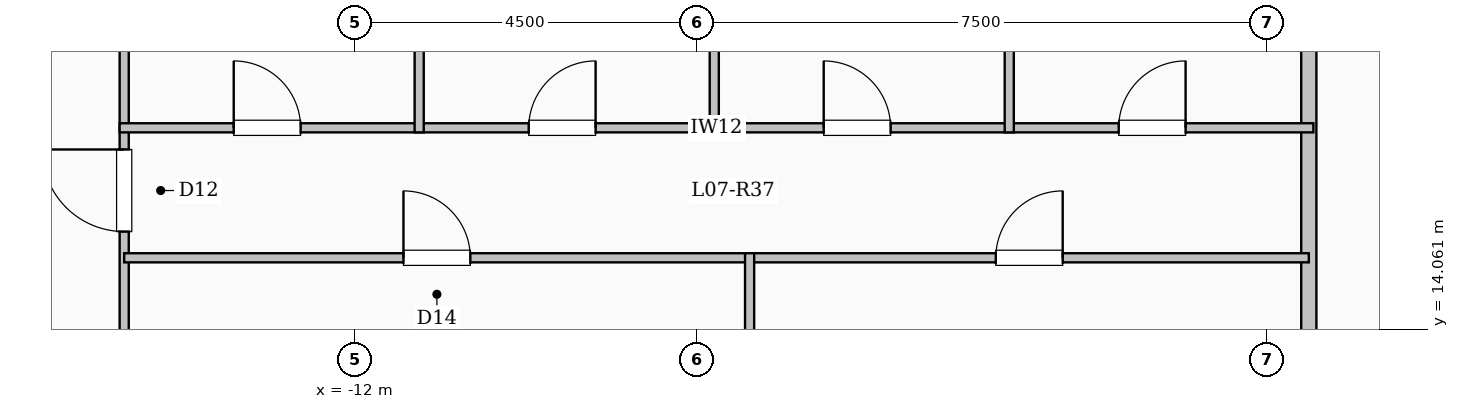
"""IFC4 building model, lengths in metres.
Left out: names, types, materials, properties, quantities, classifications, styles, units other than length and angle.
Written with IfcOpenShell. Run it as: python <this file> out.ifc"""

import sys

from ifc_helpers import new_model, si_unit, direction, frame, frame_2d, origin, place, context, subcontext, project, spatial, rectangle, extrude, element, fill, save


model = new_model("IFC4")
c1 = context("Model", 3, precision=1e-05, world=origin(), true_north=direction((0.0, 1.0)))
c2 = subcontext(c1, "Body", "Model", "MODEL_VIEW")
j1 = project(units=[si_unit("LENGTHUNIT", "METRE"), si_unit("PLANEANGLEUNIT", "RADIAN")], contexts=[c1])
p1 = place(None, origin())
s1 = spatial("IfcSite", under=j1, at=p1, CompositionType="ELEMENT")
p2 = place(p1, origin())
s2 = spatial("IfcBuilding", under=s1, at=p2, CompositionType="ELEMENT")
p3 = place(p2, frame((0.0, 0.0, 30.7)))
s3 = spatial("IfcBuildingStorey", under=s2, at=p3, CompositionType="ELEMENT", Elevation=30.7)
p4 = place(p3, frame((0.55, 12.5, 0.0), z_axis=(0.0, 0.0, 1.0), x_axis=(0.0, 1.0, 0.0)))
e1 = element("IfcWall", 1, at=p4, inside=s3, PredefinedType="SOLIDWALL", context=c2, shape_type="SweptSolid", body=[
    extrude(rectangle(XDim=12.58, YDim=0.2, at=frame_2d((6.29, 0.0))), origin(), (0.0, 0.0, 1.0), 3.1),
])
p5 = place(p3, frame((-15.035, 12.44, 0.0), z_axis=(0.0, 0.0, 1.0), x_axis=(0.0, 1.0, 0.0)))
e2 = element("IfcWall", 2, at=p5, inside=s3, PredefinedType="PARTITIONING", context=c2, shape_type="SweptSolid", body=[
    extrude(rectangle(XDim=11.16, YDim=0.12, at=frame_2d((5.58, 0.0))), origin(), (0.0, 0.0, 1.0), 2.435),
])
p6 = place(p5, frame((2.905, 0.0, 0.0)))
e3 = element("IfcOpeningElement", 3, at=p6, cuts=e2, PredefinedType="OPENING", context=c2, shape_type="SweptSolid", body=[
    extrude(rectangle(XDim=1.08, YDim=2.15, at=frame_2d((0.54, 1.075))), frame((0.0, 0.07, 0.0), z_axis=(0.0, -1.0, 0.0), x_axis=(1.0, 0.0, 0.0)), (0.0, 0.0, 1.0), 0.14),
])
p7 = place(p3, frame((-15.035, 15.0, 0.0), z_axis=(0.0, 0.0, 1.0), x_axis=(1.0, 0.0, 0.0)))
e4 = element("IfcWall", 4, at=p7, inside=s3, PredefinedType="PARTITIONING", context=c2, shape_type="SweptSolid", body=[
    extrude(rectangle(XDim=8.228, YDim=0.12, at=frame_2d((4.114, 0.0))), origin(), (0.0, 0.0, 1.0), 2.585),
])
p8 = place(p7, frame((3.674, 0.0, 0.0)))
e5 = element("IfcOpeningElement", 5, at=p8, cuts=e4, PredefinedType="OPENING", context=c2, shape_type="SweptSolid", body=[
    extrude(rectangle(XDim=0.88, YDim=2.1, at=frame_2d((0.44, 1.05))), frame((0.0, 0.07, 0.0), z_axis=(0.0, -1.0, 0.0), x_axis=(1.0, 0.0, 0.0)), (0.0, 0.0, 1.0), 0.14),
])
p9 = place(p3, frame((-6.807, 15.0, 0.0), z_axis=(0.0, 0.0, 1.0), x_axis=(1.0, 0.0, 0.0)))
e6 = element("IfcWall", 6, at=p9, inside=s3, PredefinedType="PARTITIONING", context=c2, shape_type="SweptSolid", body=[
    extrude(rectangle(XDim=7.357, YDim=0.12, at=frame_2d((3.678, 0.0))), origin(), (0.0, 0.0, 1.0), 2.585),
])
p10 = place(p9, frame((3.239, 0.0, 0.0)))
e7 = element("IfcOpeningElement", 7, at=p10, cuts=e6, PredefinedType="OPENING", context=c2, shape_type="SweptSolid", body=[
    extrude(rectangle(XDim=0.88, YDim=2.1, at=frame_2d((0.44, 1.05))), frame((0.0, 0.07, 0.0), z_axis=(0.0, -1.0, 0.0), x_axis=(1.0, 0.0, 0.0)), (0.0, 0.0, 1.0), 0.14),
])
p11 = place(p3, frame((-15.095, 16.71, 0.0), z_axis=(0.0, 0.0, 1.0), x_axis=(1.0, 0.0, 0.0)))
e8 = element("IfcWall", 8, at=p11, inside=s3, PredefinedType="PARTITIONING", context=c2, shape_type="SweptSolid", body=[
    extrude(rectangle(XDim=15.705, YDim=0.12, at=frame_2d((7.853, 0.0))), origin(), (0.0, 0.0, 1.0), 2.585),
])
p12 = place(p11, frame((1.501, 0.0, 0.0)))
e9 = element("IfcOpeningElement", 9, at=p12, cuts=e8, PredefinedType="OPENING", context=c2, shape_type="SweptSolid", body=[
    extrude(rectangle(XDim=0.88, YDim=2.1, at=frame_2d((0.44, 1.05))), frame((0.0, 0.07, 0.0), z_axis=(0.0, -1.0, 0.0), x_axis=(1.0, 0.0, 0.0)), (0.0, 0.0, 1.0), 0.14),
])
p13 = place(p11, frame((5.382, 0.0, 0.0)))
e10 = element("IfcOpeningElement", 10, at=p13, cuts=e8, PredefinedType="OPENING", context=c2, shape_type="SweptSolid", body=[
    extrude(rectangle(XDim=0.88, YDim=2.1, at=frame_2d((0.44, 1.05))), frame((0.0, 0.07, 0.0), z_axis=(0.0, -1.0, 0.0), x_axis=(1.0, 0.0, 0.0)), (0.0, 0.0, 1.0), 0.14),
])
p14 = place(p11, frame((9.263, 0.0, 0.0)))
e11 = element("IfcOpeningElement", 11, at=p14, cuts=e8, PredefinedType="OPENING", context=c2, shape_type="SweptSolid", body=[
    extrude(rectangle(XDim=0.88, YDim=2.1, at=frame_2d((0.44, 1.05))), frame((0.0, 0.07, 0.0), z_axis=(0.0, -1.0, 0.0), x_axis=(1.0, 0.0, 0.0)), (0.0, 0.0, 1.0), 0.14),
])
p15 = place(p11, frame((13.144, 0.0, 0.0)))
e12 = element("IfcOpeningElement", 12, at=p15, cuts=e8, PredefinedType="OPENING", context=c2, shape_type="SweptSolid", body=[
    extrude(rectangle(XDim=0.88, YDim=2.1, at=frame_2d((0.44, 1.05))), frame((0.0, 0.07, 0.0), z_axis=(0.0, -1.0, 0.0), x_axis=(1.0, 0.0, 0.0)), (0.0, 0.0, 1.0), 0.14),
])
p16 = place(p3, frame((-6.807, 12.44, 0.0), z_axis=(0.0, 0.0, 1.0), x_axis=(0.0, 1.0, 0.0)))
e13 = element("IfcWall", 13, at=p16, inside=s3, PredefinedType="PARTITIONING", context=c2, shape_type="SweptSolid", body=[
    extrude(rectangle(XDim=2.62, YDim=0.12, at=frame_2d((1.31, 0.0))), origin(), (0.0, 0.0, 1.0), 3.1),
])
p17 = place(p3, frame((-11.154, 16.65, 0.0), z_axis=(0.0, 0.0, 1.0), x_axis=(0.0, 1.0, 0.0)))
e14 = element("IfcWall", 14, at=p17, inside=s3, PredefinedType="PARTITIONING", context=c2, shape_type="SweptSolid", body=[
    extrude(rectangle(XDim=6.95, YDim=0.12, at=frame_2d((3.475, 0.0))), origin(), (0.0, 0.0, 1.0), 3.1),
])
p18 = place(p3, frame((-7.272, 16.65, 0.0), z_axis=(0.0, 0.0, 1.0), x_axis=(0.0, 1.0, 0.0)))
e15 = element("IfcWall", 15, at=p18, inside=s3, PredefinedType="PARTITIONING", context=c2, shape_type="SweptSolid", body=[
    extrude(rectangle(XDim=7.87, YDim=0.12, at=frame_2d((3.935, 0.0))), origin(), (0.0, 0.0, 1.0), 2.435),
])
p19 = place(p3, frame((-3.391, 16.65, 0.0), z_axis=(0.0, 0.0, 1.0), x_axis=(0.0, 1.0, 0.0)))
e16 = element("IfcWall", 16, at=p19, inside=s3, PredefinedType="PARTITIONING", context=c2, shape_type="SweptSolid", body=[
    extrude(rectangle(XDim=8.43, YDim=0.12, at=frame_2d((4.215, 0.0))), origin(), (0.0, 0.0, 1.0), 3.1),
])
p20 = place(p6, origin())
e17 = element("IfcDoor", 17, at=p20, inside=s3, OperationType="SINGLE_SWING_RIGHT", PredefinedType="DOOR", context=c2, shape_type="SweptSolid", body=[
    extrude(rectangle(XDim=1.08, YDim=2.15, at=frame_2d((0.54, 1.075))), frame((0.0, 0.025, 0.0), z_axis=(0.0, -1.0, 0.0), x_axis=(1.0, 0.0, 0.0)), (0.0, 0.0, 1.0), 0.05),
])
fill(e3, e17)
p21 = place(p8, origin())
e18 = element("IfcDoor", 18, at=p21, inside=s3, OperationType="SINGLE_SWING_LEFT", PredefinedType="DOOR", context=c2, shape_type="SweptSolid", body=[
    extrude(rectangle(XDim=0.88, YDim=2.1, at=frame_2d((0.44, 1.05))), frame((0.0, 0.025, 0.0), z_axis=(0.0, -1.0, 0.0), x_axis=(1.0, 0.0, 0.0)), (0.0, 0.0, 1.0), 0.05),
])
fill(e5, e18)
p22 = place(p10, origin())
e19 = element("IfcDoor", 19, at=p22, inside=s3, OperationType="SINGLE_SWING_RIGHT", PredefinedType="DOOR", context=c2, shape_type="SweptSolid", body=[
    extrude(rectangle(XDim=0.88, YDim=2.1, at=frame_2d((0.44, 1.05))), frame((0.0, 0.025, 0.0), z_axis=(0.0, -1.0, 0.0), x_axis=(1.0, 0.0, 0.0)), (0.0, 0.0, 1.0), 0.05),
])
fill(e7, e19)
p23 = place(p12, origin())
e20 = element("IfcDoor", 20, at=p23, inside=s3, OperationType="SINGLE_SWING_LEFT", PredefinedType="DOOR", context=c2, shape_type="SweptSolid", body=[
    extrude(rectangle(XDim=0.88, YDim=2.1, at=frame_2d((0.44, 1.05))), frame((0.0, 0.025, 0.0), z_axis=(0.0, -1.0, 0.0), x_axis=(1.0, 0.0, 0.0)), (0.0, 0.0, 1.0), 0.05),
])
fill(e9, e20)
p24 = place(p13, origin())
e21 = element("IfcDoor", 21, at=p24, inside=s3, OperationType="SINGLE_SWING_RIGHT", PredefinedType="DOOR", context=c2, shape_type="SweptSolid", body=[
    extrude(rectangle(XDim=0.88, YDim=2.1, at=frame_2d((0.44, 1.05))), frame((0.0, 0.025, 0.0), z_axis=(0.0, -1.0, 0.0), x_axis=(1.0, 0.0, 0.0)), (0.0, 0.0, 1.0), 0.05),
])
fill(e10, e21)
p25 = place(p14, origin())
e22 = element("IfcDoor", 22, at=p25, inside=s3, OperationType="SINGLE_SWING_LEFT", PredefinedType="DOOR", context=c2, shape_type="SweptSolid", body=[
    extrude(rectangle(XDim=0.88, YDim=2.1, at=frame_2d((0.44, 1.05))), frame((0.0, 0.025, 0.0), z_axis=(0.0, -1.0, 0.0), x_axis=(1.0, 0.0, 0.0)), (0.0, 0.0, 1.0), 0.05),
])
fill(e11, e22)
p26 = place(p15, origin())
e23 = element("IfcDoor", 23, at=p26, inside=s3, OperationType="SINGLE_SWING_RIGHT", PredefinedType="DOOR", context=c2, shape_type="SweptSolid", body=[
    extrude(rectangle(XDim=0.88, YDim=2.1, at=frame_2d((0.44, 1.05))), frame((0.0, 0.025, 0.0), z_axis=(0.0, -1.0, 0.0), x_axis=(1.0, 0.0, 0.0)), (0.0, 0.0, 1.0), 0.05),
])
fill(e12, e23)
save(model, sys.argv[1])
